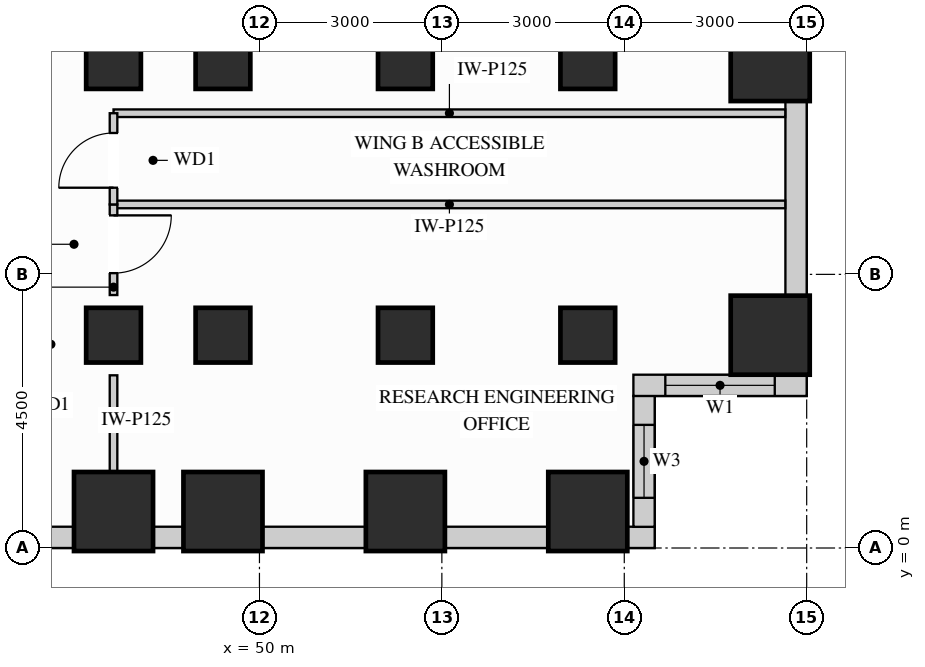
"""IFC4 building model, lengths in metres.
Left out: names, types, materials, properties, quantities, classifications, styles, units other than length and angle.
Written with IfcOpenShell. Run it as: python <this file> out.ifc"""

import sys

from ifc_helpers import new_model, si_unit, direction, frame, frame_2d, origin, origin_2d, place, context, subcontext, project, spatial, rectangle, extrude, source, transform, mapped, element, fill, save


model = new_model("IFC4")
c1 = context("Model", 3, precision=1e-05, world=origin(), true_north=direction((0.0, 1.0)))
c2 = subcontext(c1, "Body", "Model", "MODEL_VIEW")
j1 = project(units=[si_unit("LENGTHUNIT", "METRE"), si_unit("PLANEANGLEUNIT", "RADIAN")], contexts=[c1])
p1 = place(None, origin())
s1 = spatial("IfcSite", under=j1, at=p1, CompositionType="ELEMENT")
p2 = place(p1, origin())
s2 = spatial("IfcBuilding", under=s1, at=p2, CompositionType="ELEMENT")
p3 = place(p2, frame((0.0, 0.0, 58.5)))
s3 = spatial("IfcBuildingStorey", under=s2, at=p3, CompositionType="ELEMENT", Elevation=58.5)
m1 = source(origin(), c2, "Body", "SweptSolid", [
    extrude(rectangle(XDim=0.9, YDim=0.9, at=origin_2d()), origin(), (0.0, 0.0, 1.0), 3.38),
])
for number, where, z_axis, x_axis in (
    (1, (47.6, 3.5, 0.0), (0.0, 0.0, 1.0), (1.0, 0.0, 0.0)),
    (2, (47.6, 8.0, 0.0), (0.0, 0.0, 1.0), (1.0, 0.0, 0.0)),
    (3, (49.4, 3.5, 0.0), (0.0, 0.0, 1.0), (1.0, 0.0, 0.0)),
    (4, (49.4, 8.0, 0.0), (0.0, 0.0, 1.0), (1.0, 0.0, 0.0)),
    (5, (52.4, 3.5, 0.0), (0.0, 0.0, 1.0), (1.0, 0.0, 0.0)),
    (6, (52.4, 8.0, 0.0), (0.0, 0.0, 1.0), (1.0, 0.0, 0.0)),
    (7, (55.4, 3.5, 0.0), (0.0, 0.0, 1.0), (1.0, 0.0, 0.0)),
    (8, (55.4, 8.0, 0.0), (0.0, 0.0, 1.0), (1.0, 0.0, 0.0)),
):
    element("IfcColumn", number, at=place(p3, frame(where, z_axis=z_axis, x_axis=x_axis)), inside=s3, PredefinedType="COLUMN", context=c2, shape_type="MappedRepresentation", body=[
        mapped(m1, transform((0.0, 0.0, 0.0), x_axis=(1.0, 0.0, 0.0), y_axis=(0.0, 1.0, 0.0), z_axis=(0.0, 0.0, 1.0))),
    ])
m2 = source(origin(), c2, "Body", "SweptSolid", [
    extrude(rectangle(XDim=1.3, YDim=1.3, at=origin_2d()), origin(), (0.0, 0.0, 1.0), 3.38),
])
for number, where, z_axis, x_axis in (
    (9, (58.4, 3.5, 0.0), (0.0, 0.0, 1.0), (1.0, 0.0, 0.0)),
    (10, (58.4, 8.0, 0.0), (0.0, 0.0, 1.0), (1.0, 0.0, 0.0)),
    (11, (47.6, 0.6, 0.0), (0.0, 0.0, 1.0), (1.0, 0.0, 0.0)),
    (12, (49.4, 0.6, 0.0), (0.0, 0.0, 1.0), (1.0, 0.0, 0.0)),
    (13, (52.4, 0.6, 0.0), (0.0, 0.0, 1.0), (1.0, 0.0, 0.0)),
    (14, (55.4, 0.6, 0.0), (0.0, 0.0, 1.0), (1.0, 0.0, 0.0)),
):
    element("IfcColumn", number, at=place(p3, frame(where, z_axis=z_axis, x_axis=x_axis)), inside=s3, PredefinedType="COLUMN", context=c2, shape_type="MappedRepresentation", body=[
        mapped(m2, transform((0.0, 0.0, 0.0), x_axis=(1.0, 0.0, 0.0), y_axis=(0.0, 1.0, 0.0), z_axis=(0.0, 0.0, 1.0))),
    ])
p4 = place(p3, frame((40.648, 0.175, 0.0), z_axis=(0.0, 0.0, 1.0), x_axis=(1.0, 0.0, 0.0)))
e15 = element("IfcWall", 15, at=p4, inside=s3, PredefinedType="SOLIDWALL", context=c2, shape_type="SweptSolid", body=[
    extrude(rectangle(XDim=6.304, YDim=0.35, at=frame_2d((3.152, 0.0))), origin(), (0.0, 0.0, 1.0), 2.428),
])
p5 = place(p4, frame((0.687, 0.0, 0.78)))
e16 = element("IfcOpeningElement", 16, at=p5, cuts=e15, PredefinedType="OPENING", context=c2, shape_type="SweptSolid", body=[
    extrude(rectangle(XDim=1.8, YDim=1.468, at=frame_2d((0.9, 0.734))), frame((0.0, 0.185, 0.0), z_axis=(0.0, -1.0, 0.0), x_axis=(1.0, 0.0, 0.0)), (0.0, 0.0, 1.0), 0.37),
])
p6 = place(p4, frame((2.855, 0.0, 0.78)))
e17 = element("IfcOpeningElement", 17, at=p6, cuts=e15, PredefinedType="OPENING", context=c2, shape_type="SweptSolid", body=[
    extrude(rectangle(XDim=1.8, YDim=1.468, at=frame_2d((0.9, 0.734))), frame((0.0, 0.185, 0.0), z_axis=(0.0, -1.0, 0.0), x_axis=(1.0, 0.0, 0.0)), (0.0, 0.0, 1.0), 0.37),
])
m3 = source(origin(), c2, "Body", "SweptSolid", [
    extrude(rectangle(XDim=0.504, YDim=0.35, at=frame_2d((0.252, 0.0))), origin(), (0.0, 0.0, 1.0), 3.365),
])
p7 = place(p3, frame((48.248, 0.175, 0.0), z_axis=(0.0, 0.0, 1.0), x_axis=(1.0, 0.0, 0.0)))
e18 = element("IfcWall", 18, at=p7, inside=s3, PredefinedType="SOLIDWALL", context=c2, shape_type="MappedRepresentation", body=[
    mapped(m3, transform((0.0, 0.0, 0.0), x_axis=(1.0, 0.0, 0.0), y_axis=(0.0, 1.0, 0.0), z_axis=(0.0, 0.0, 1.0))),
])
m4 = source(origin(), c2, "Body", "SweptSolid", [
    extrude(rectangle(XDim=1.704, YDim=0.35, at=frame_2d((0.852, 0.0))), origin(), (0.0, 0.0, 1.0), 2.51),
])
for number, where, z_axis, x_axis in (
    (19, (50.048, 0.175, 0.0), (0.0, 0.0, 1.0), (1.0, 0.0, 0.0)),
    (20, (53.048, 0.175, 0.0), (0.0, 0.0, 1.0), (1.0, 0.0, 0.0)),
):
    element("IfcWall", number, at=place(p3, frame(where, z_axis=z_axis, x_axis=x_axis)), inside=s3, PredefinedType="SOLIDWALL", context=c2, shape_type="MappedRepresentation", body=[
        mapped(m4, transform((0.0, 0.0, 0.0), x_axis=(1.0, 0.0, 0.0), y_axis=(0.0, 1.0, 0.0), z_axis=(0.0, 0.0, 1.0))),
    ])
m5 = source(origin(), c2, "Body", "SweptSolid", [
    extrude(rectangle(XDim=0.452, YDim=0.35, at=frame_2d((0.226, 0.0))), origin(), (0.0, 0.0, 1.0), 3.365),
])
p8 = place(p3, frame((56.048, 0.175, 0.0), z_axis=(0.0, 0.0, 1.0), x_axis=(1.0, 0.0, 0.0)))
e21 = element("IfcWall", 21, at=p8, inside=s3, PredefinedType="SOLIDWALL", context=c2, shape_type="MappedRepresentation", body=[
    mapped(m5, transform((0.0, 0.0, 0.0), x_axis=(1.0, 0.0, 0.0), y_axis=(0.0, 1.0, 0.0), z_axis=(0.0, 0.0, 1.0))),
])
p9 = place(p3, frame((56.325, 0.348, 0.0), z_axis=(0.0, 0.0, 1.0), x_axis=(0.0, 1.0, 0.0)))
e22 = element("IfcWall", 22, at=p9, inside=s3, PredefinedType="SOLIDWALL", context=c2, shape_type="SweptSolid", body=[
    extrude(rectangle(XDim=2.154, YDim=0.35, at=frame_2d((1.077, 0.0))), origin(), (0.0, 0.0, 1.0), 3.365),
])
p10 = place(p9, frame((0.477, 0.0, 0.78)))
e23 = element("IfcOpeningElement", 23, at=p10, cuts=e22, PredefinedType="OPENING", context=c2, shape_type="SweptSolid", body=[
    extrude(rectangle(XDim=1.2, YDim=2.1, at=frame_2d((0.6, 1.05))), frame((0.0, 0.185, 0.0), z_axis=(0.0, -1.0, 0.0), x_axis=(1.0, 0.0, 0.0)), (0.0, 0.0, 1.0), 0.37),
])
p11 = place(p3, frame((56.15, 2.675, 0.0), z_axis=(0.0, 0.0, 1.0), x_axis=(1.0, 0.0, 0.0)))
e24 = element("IfcWall", 24, at=p11, inside=s3, PredefinedType="SOLIDWALL", context=c2, shape_type="SweptSolid", body=[
    extrude(rectangle(XDim=2.85, YDim=0.35, at=frame_2d((1.425, 0.0))), origin(), (0.0, 0.0, 1.0), 3.365),
])
p12 = place(p11, frame((0.525, 0.0, 0.78)))
e25 = element("IfcOpeningElement", 25, at=p12, cuts=e24, PredefinedType="OPENING", context=c2, shape_type="SweptSolid", body=[
    extrude(rectangle(XDim=1.8, YDim=2.1, at=frame_2d((0.9, 1.05))), frame((0.0, 0.185, 0.0), z_axis=(0.0, -1.0, 0.0), x_axis=(1.0, 0.0, 0.0)), (0.0, 0.0, 1.0), 0.37),
])
m6 = source(origin(), c2, "Body", "SweptSolid", [
    extrude(rectangle(XDim=3.204, YDim=0.35, at=frame_2d((1.602, 0.0))), origin(), (0.0, 0.0, 1.0), 2.51),
])
p13 = place(p3, frame((58.825, 4.148, 0.0), z_axis=(0.0, 0.0, 1.0), x_axis=(0.0, 1.0, 0.0)))
e26 = element("IfcWall", 26, at=p13, inside=s3, PredefinedType="SOLIDWALL", context=c2, shape_type="MappedRepresentation", body=[
    mapped(m6, transform((0.0, 0.0, 0.0), x_axis=(1.0, 0.0, 0.0), y_axis=(0.0, 1.0, 0.0), z_axis=(0.0, 0.0, 1.0))),
])
m7 = source(origin(), c2, "Body", "SweptSolid", [
    extrude(rectangle(XDim=11.048, YDim=0.125, at=frame_2d((5.524, 0.0))), origin(), (0.0, 0.0, 1.0), 3.365),
])
for number, where, z_axis, x_axis in (
    (27, (47.6, 5.65, 0.0), (0.0, 0.0, 1.0), (1.0, 0.0, 0.0)),
    (28, (47.6, 7.15, 0.0), (0.0, 0.0, 1.0), (1.0, 0.0, 0.0)),
):
    element("IfcWall", number, at=place(p3, frame(where, z_axis=z_axis, x_axis=x_axis)), inside=s3, PredefinedType="PARTITIONING", context=c2, shape_type="MappedRepresentation", body=[
        mapped(m7, transform((0.0, 0.0, 0.0), x_axis=(1.0, 0.0, 0.0), y_axis=(0.0, 1.0, 0.0), z_axis=(0.0, 0.0, 1.0))),
    ])
p14 = place(p3, frame((47.6, 4.16, 0.0), z_axis=(0.0, 0.0, 1.0), x_axis=(0.0, 1.0, 0.0)))
e29 = element("IfcWall", 29, at=p14, inside=s3, PredefinedType="PARTITIONING", context=c2, shape_type="SweptSolid", body=[
    extrude(rectangle(XDim=1.49, YDim=0.125, at=frame_2d((0.745, 0.0))), origin(), (0.0, 0.0, 1.0), 2.67),
])
p15 = place(p14, frame((0.36, 0.0, 0.0)))
e30 = element("IfcOpeningElement", 30, at=p15, cuts=e29, PredefinedType="OPENING", context=c2, shape_type="SweptSolid", body=[
    extrude(rectangle(XDim=0.95, YDim=2.15, at=frame_2d((0.475, 1.075))), frame((0.0, 0.073, 0.0), z_axis=(0.0, -1.0, 0.0), x_axis=(1.0, 0.0, 0.0)), (0.0, 0.0, 1.0), 0.145),
])
m8 = source(origin(), c2, "Body", "SweptSolid", [
    extrude(rectangle(XDim=1.58, YDim=0.125, at=frame_2d((0.79, 0.0))), origin(), (0.0, 0.0, 1.0), 2.67),
])
p16 = place(p3, frame((47.6, 1.26, 0.0), z_axis=(0.0, 0.0, 1.0), x_axis=(0.0, 1.0, 0.0)))
e31 = element("IfcWall", 31, at=p16, inside=s3, PredefinedType="PARTITIONING", context=c2, shape_type="MappedRepresentation", body=[
    mapped(m8, transform((0.0, 0.0, 0.0), x_axis=(1.0, 0.0, 0.0), y_axis=(0.0, 1.0, 0.0), z_axis=(0.0, 0.0, 1.0))),
])
p17 = place(p3, frame((47.6, 5.65, 0.0), z_axis=(0.0, 0.0, 1.0), x_axis=(0.0, 1.0, 0.0)))
e32 = element("IfcWall", 32, at=p17, inside=s3, PredefinedType="PARTITIONING", context=c2, shape_type="SweptSolid", body=[
    extrude(rectangle(XDim=1.5, YDim=0.125, at=frame_2d((0.75, 0.0))), origin(), (0.0, 0.0, 1.0), 2.67),
])
p18 = place(p17, frame((0.275, 0.0, 0.0)))
e33 = element("IfcOpeningElement", 33, at=p18, cuts=e32, PredefinedType="OPENING", context=c2, shape_type="SweptSolid", body=[
    extrude(rectangle(XDim=0.9, YDim=2.15, at=frame_2d((0.45, 1.075))), frame((0.0, 0.073, 0.0), z_axis=(0.0, -1.0, 0.0), x_axis=(1.0, 0.0, 0.0)), (0.0, 0.0, 1.0), 0.145),
])
m9 = source(origin(), c2, "Body", "SweptSolid", [
    extrude(rectangle(XDim=0.95, YDim=2.15, at=frame_2d((0.475, 1.075))), frame((0.0, 0.025, 0.0), z_axis=(0.0, -1.0, 0.0), x_axis=(1.0, 0.0, 0.0)), (0.0, 0.0, 1.0), 0.05),
])
p19 = place(p15, origin())
e34 = element("IfcDoor", 34, at=p19, inside=s3, OperationType="SINGLE_SWING_RIGHT", PredefinedType="DOOR", context=c2, shape_type="MappedRepresentation", body=[
    mapped(m9, transform((0.0, 0.0, 0.0), x_axis=(1.0, 0.0, 0.0), y_axis=(0.0, 1.0, 0.0), z_axis=(0.0, 0.0, 1.0))),
])
fill(e30, e34)
m10 = source(origin(), c2, "Body", "SweptSolid", [
    extrude(rectangle(XDim=0.9, YDim=2.15, at=frame_2d((0.45, 1.075))), frame((0.0, 0.025, 0.0), z_axis=(0.0, -1.0, 0.0), x_axis=(1.0, 0.0, 0.0)), (0.0, 0.0, 1.0), 0.05),
])
p20 = place(p18, origin())
e35 = element("IfcDoor", 35, at=p20, inside=s3, OperationType="SINGLE_SWING_LEFT", PredefinedType="DOOR", context=c2, shape_type="MappedRepresentation", body=[
    mapped(m10, transform((0.0, 0.0, 0.0), x_axis=(1.0, 0.0, 0.0), y_axis=(0.0, 1.0, 0.0), z_axis=(0.0, 0.0, 1.0))),
])
fill(e33, e35)
m11 = source(origin(), c2, "Body", "SweptSolid", [
    extrude(rectangle(XDim=1.8, YDim=2.1, at=frame_2d((0.9, 1.05))), frame((0.0, 0.03, 0.0), z_axis=(0.0, -1.0, 0.0), x_axis=(1.0, 0.0, 0.0)), (0.0, 0.0, 1.0), 0.06),
])
p21 = place(p12, origin())
e36 = element("IfcWindow", 36, at=p21, inside=s3, PartitioningType="SINGLE_PANEL", PredefinedType="WINDOW", context=c2, shape_type="MappedRepresentation", body=[
    mapped(m11, transform((0.0, 0.0, 0.0), x_axis=(1.0, 0.0, 0.0), y_axis=(0.0, 1.0, 0.0), z_axis=(0.0, 0.0, 1.0))),
])
fill(e25, e36)
m12 = source(origin(), c2, "Body", "SweptSolid", [
    extrude(rectangle(XDim=1.2, YDim=2.1, at=frame_2d((0.6, 1.05))), frame((0.0, 0.03, 0.0), z_axis=(0.0, -1.0, 0.0), x_axis=(1.0, 0.0, 0.0)), (0.0, 0.0, 1.0), 0.06),
])
p22 = place(p10, origin())
e37 = element("IfcWindow", 37, at=p22, inside=s3, PartitioningType="SINGLE_PANEL", PredefinedType="WINDOW", context=c2, shape_type="MappedRepresentation", body=[
    mapped(m12, transform((0.0, 0.0, 0.0), x_axis=(1.0, 0.0, 0.0), y_axis=(0.0, 1.0, 0.0), z_axis=(0.0, 0.0, 1.0))),
])
fill(e23, e37)
save(model, sys.argv[1])
